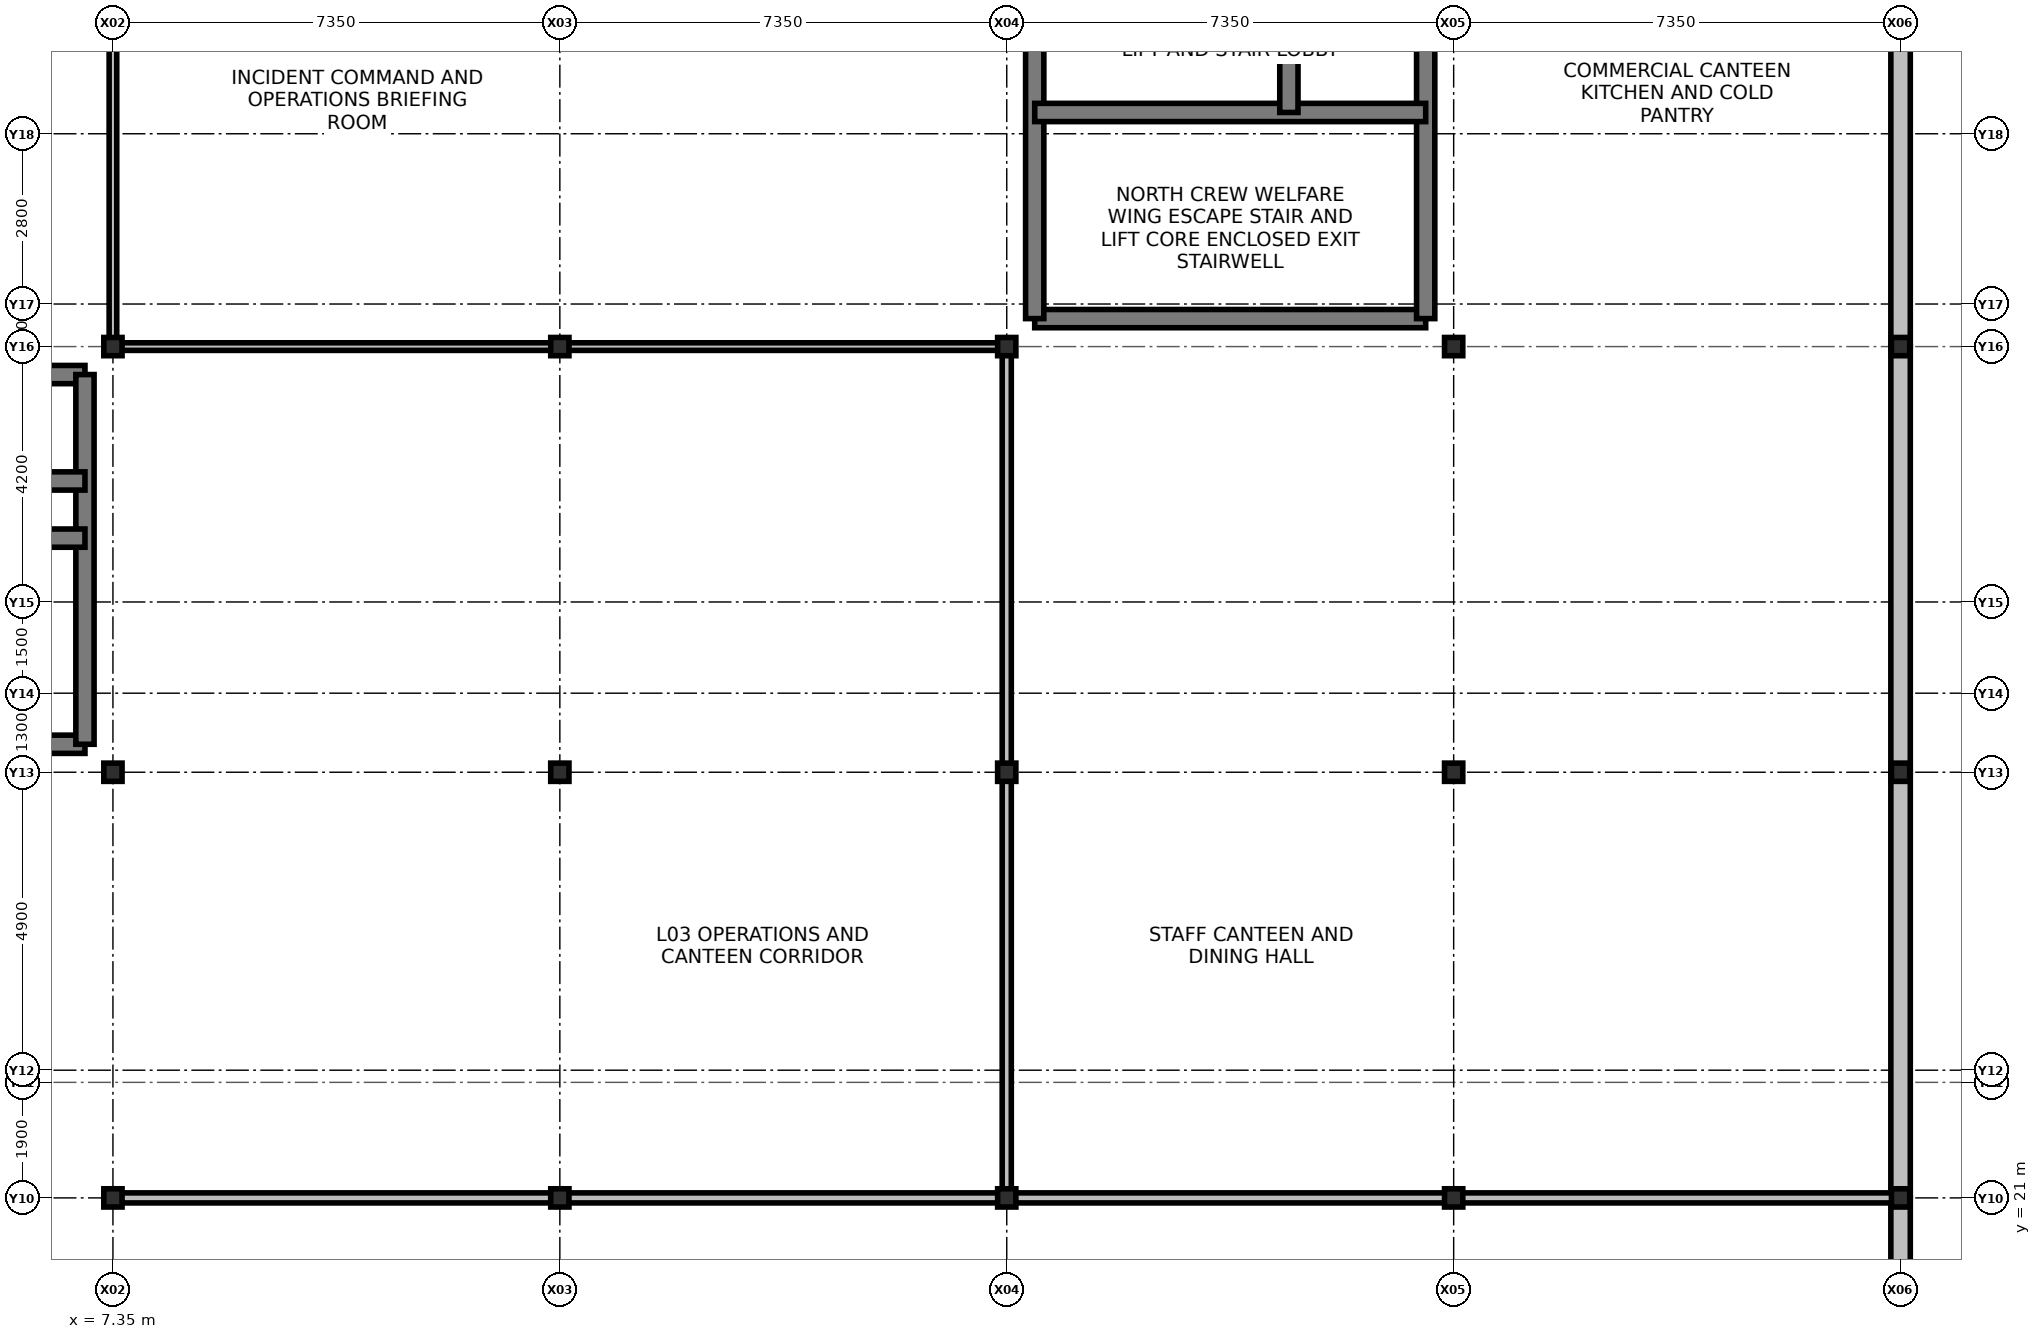
"""IFC4 building model, lengths in metres.
Left out: names, types, materials, properties, quantities, classifications, styles, units other than length and angle.
Written with IfcOpenShell. Run it as: python <this file> out.ifc"""

import sys

from ifc_helpers import new_model, si_unit, direction, frame, frame_2d, origin, origin_2d, place, context, subcontext, project, spatial, rectangle, i_section, extrude, element, fill, save


model = new_model("IFC4")
c1 = context("Model", 3, precision=1e-05, world=origin(), true_north=direction((0.0, 1.0)))
c2 = subcontext(c1, "Body", "Model", "MODEL_VIEW")
j1 = project(units=[si_unit("LENGTHUNIT", "METRE"), si_unit("PLANEANGLEUNIT", "RADIAN")], contexts=[c1])
p1 = place(None, origin())
s1 = spatial("IfcSite", under=j1, at=p1, CompositionType="ELEMENT")
p2 = place(p1, origin())
s2 = spatial("IfcBuilding", under=s1, at=p2, CompositionType="ELEMENT")
p3 = place(p2, frame((0.0, 0.0, 11.1)))
s3 = spatial("IfcBuildingStorey", under=s2, at=p3, CompositionType="ELEMENT", Elevation=11.1)
for number, where, z_axis, x_axis in (
    (1, (7.35, 21.0, 0.0), (0.0, 0.0, 1.0), (1.0, 0.0, 0.0)),
    (2, (7.35, 28.0, 0.0), (0.0, 0.0, 1.0), (1.0, 0.0, 0.0)),
    (3, (7.35, 35.0, 0.0), (0.0, 0.0, 1.0), (1.0, 0.0, 0.0)),
    (4, (14.7, 21.0, 0.0), (0.0, 0.0, 1.0), (1.0, 0.0, 0.0)),
    (5, (14.7, 28.0, 0.0), (0.0, 0.0, 1.0), (1.0, 0.0, 0.0)),
    (6, (14.7, 35.0, 0.0), (0.0, 0.0, 1.0), (1.0, 0.0, 0.0)),
    (7, (22.05, 21.0, 0.0), (0.0, 0.0, 1.0), (1.0, 0.0, 0.0)),
    (8, (22.05, 28.0, 0.0), (0.0, 0.0, 1.0), (1.0, 0.0, 0.0)),
    (9, (22.05, 35.0, 0.0), (0.0, 0.0, 1.0), (1.0, 0.0, 0.0)),
    (10, (29.4, 21.0, 0.0), (0.0, 0.0, 1.0), (1.0, 0.0, 0.0)),
    (11, (29.4, 28.0, 0.0), (0.0, 0.0, 1.0), (1.0, 0.0, 0.0)),
    (12, (29.4, 35.0, 0.0), (0.0, 0.0, 1.0), (1.0, 0.0, 0.0)),
    (13, (36.75, 21.0, 0.0), (0.0, 0.0, 1.0), (1.0, 0.0, 0.0)),
    (14, (36.75, 28.0, 0.0), (0.0, 0.0, 1.0), (1.0, 0.0, 0.0)),
    (15, (36.75, 35.0, 0.0), (0.0, 0.0, 1.0), (1.0, 0.0, 0.0)),
):
    element("IfcColumn", number, at=place(p3, frame(where, z_axis=z_axis, x_axis=x_axis)), inside=s3, PredefinedType="COLUMN", context=c2, shape_type="SweptSolid", body=[
        extrude(i_section(OverallWidth=0.3, OverallDepth=0.3, WebThickness=0.01, FlangeThickness=0.015, at=origin_2d()), origin(), (0.0, 0.0, 1.0), 4.2),
    ])
p4 = place(p3, frame((36.75, 14.0, 0.0), z_axis=(0.0, 0.0, 1.0), x_axis=(0.0, 1.0, 0.0)))
e16 = element("IfcWall", 16, at=p4, inside=s3, PredefinedType="SOLIDWALL", context=c2, shape_type="SweptSolid", body=[
    extrude(rectangle(XDim=7.0, YDim=0.32, at=frame_2d((3.5, 0.0))), origin(), (0.0, 0.0, 1.0), 3.35),
])
p5 = place(p3, frame((36.75, 21.0, 0.0), z_axis=(0.0, 0.0, 1.0), x_axis=(0.0, 1.0, 0.0)))
e17 = element("IfcWall", 17, at=p5, inside=s3, PredefinedType="SOLIDWALL", context=c2, shape_type="SweptSolid", body=[
    extrude(rectangle(XDim=7.0, YDim=0.32, at=frame_2d((3.5, 0.0))), origin(), (0.0, 0.0, 1.0), 3.35),
])
p6 = place(p5, frame((2.95, 0.0, 0.0)))
e18 = element("IfcOpeningElement", 18, at=p6, cuts=e17, PredefinedType="OPENING", context=c2, shape_type="SweptSolid", body=[
    extrude(rectangle(XDim=1.1, YDim=2.2, at=frame_2d((0.55, 1.1))), frame((0.0, 0.17, 0.0), z_axis=(0.0, -1.0, 0.0), x_axis=(1.0, 0.0, 0.0)), (0.0, 0.0, 1.0), 0.34),
])
p7 = place(p3, frame((36.75, 28.0, 0.0), z_axis=(0.0, 0.0, 1.0), x_axis=(0.0, 1.0, 0.0)))
e19 = element("IfcWall", 19, at=p7, inside=s3, PredefinedType="SOLIDWALL", context=c2, shape_type="SweptSolid", body=[
    extrude(rectangle(XDim=7.0, YDim=0.32, at=frame_2d((3.5, 0.0))), origin(), (0.0, 0.0, 1.0), 3.35),
])
p8 = place(p7, frame((2.95, 0.0, 0.0)))
e20 = element("IfcOpeningElement", 20, at=p8, cuts=e19, PredefinedType="OPENING", context=c2, shape_type="SweptSolid", body=[
    extrude(rectangle(XDim=1.1, YDim=2.2, at=frame_2d((0.55, 1.1))), frame((0.0, 0.17, 0.0), z_axis=(0.0, -1.0, 0.0), x_axis=(1.0, 0.0, 0.0)), (0.0, 0.0, 1.0), 0.34),
])
p9 = place(p3, frame((36.75, 35.0, 0.0), z_axis=(0.0, 0.0, 1.0), x_axis=(0.0, 1.0, 0.0)))
e21 = element("IfcWall", 21, at=p9, inside=s3, PredefinedType="SOLIDWALL", context=c2, shape_type="SweptSolid", body=[
    extrude(rectangle(XDim=7.0, YDim=0.32, at=frame_2d((3.5, 0.0))), origin(), (0.0, 0.0, 1.0), 3.35),
])
p10 = place(p3, frame((0.46, 28.46, 0.0), z_axis=(0.0, 0.0, 1.0), x_axis=(1.0, 0.0, 0.0)))
e22 = element("IfcWall", 22, at=p10, inside=s3, PredefinedType="SHEAR", context=c2, shape_type="SweptSolid", body=[
    extrude(rectangle(XDim=6.43, YDim=0.3, at=frame_2d((3.215, 0.0))), origin(), (0.0, 0.0, 1.0), 3.92),
])
p11 = place(p3, frame((0.46, 34.54, 0.0), z_axis=(0.0, 0.0, 1.0), x_axis=(1.0, 0.0, 0.0)))
e23 = element("IfcWall", 23, at=p11, inside=s3, PredefinedType="SHEAR", context=c2, shape_type="SweptSolid", body=[
    extrude(rectangle(XDim=6.43, YDim=0.3, at=frame_2d((3.215, 0.0))), origin(), (0.0, 0.0, 1.0), 3.92),
])
p12 = place(p11, frame((0.55, 0.0, 0.0)))
e24 = element("IfcOpeningElement", 24, at=p12, cuts=e23, PredefinedType="OPENING", context=c2, shape_type="SweptSolid", body=[
    extrude(rectangle(XDim=1.5, YDim=2.2, at=frame_2d((0.75, 1.1))), frame((0.0, 0.16, 0.0), z_axis=(0.0, -1.0, 0.0), x_axis=(1.0, 0.0, 0.0)), (0.0, 0.0, 1.0), 0.32),
])
p13 = place(p3, frame((6.89, 28.46, 0.0), z_axis=(0.0, 0.0, 1.0), x_axis=(0.0, 1.0, 0.0)))
e25 = element("IfcWall", 25, at=p13, inside=s3, PredefinedType="SHEAR", context=c2, shape_type="SweptSolid", body=[
    extrude(rectangle(XDim=6.08, YDim=0.3, at=frame_2d((3.04, 0.0))), origin(), (0.0, 0.0, 1.0), 3.92),
])
p14 = place(p3, frame((0.46, 31.85, 0.0), z_axis=(0.0, 0.0, 1.0), x_axis=(1.0, 0.0, 0.0)))
e26 = element("IfcWall", 26, at=p14, inside=s3, PredefinedType="SHEAR", context=c2, shape_type="SweptSolid", body=[
    extrude(rectangle(XDim=6.43, YDim=0.3, at=frame_2d((3.215, 0.0))), origin(), (0.0, 0.0, 1.0), 3.92),
])
p15 = place(p14, frame((0.185, 0.0, 0.0)))
e27 = element("IfcOpeningElement", 27, at=p15, cuts=e26, PredefinedType="OPENING", context=c2, shape_type="SweptSolid", body=[
    extrude(rectangle(XDim=1.05, YDim=2.15, at=frame_2d((0.525, 1.075))), frame((0.0, 0.16, 0.0), z_axis=(0.0, -1.0, 0.0), x_axis=(1.0, 0.0, 0.0)), (0.0, 0.0, 1.0), 0.32),
])
p16 = place(p3, frame((3.34, 32.79, 0.0), z_axis=(0.0, 0.0, 1.0), x_axis=(1.0, 0.0, 0.0)))
e28 = element("IfcWall", 28, at=p16, inside=s3, PredefinedType="SHEAR", context=c2, shape_type="SweptSolid", body=[
    extrude(rectangle(XDim=3.55, YDim=0.3, at=frame_2d((1.775, 0.0))), origin(), (0.0, 0.0, 1.0), 3.92),
])
p17 = place(p16, frame((0.25, 0.0, 0.0)))
e29 = element("IfcOpeningElement", 29, at=p17, cuts=e28, PredefinedType="OPENING", context=c2, shape_type="SweptSolid", body=[
    extrude(rectangle(XDim=1.1, YDim=2.15, at=frame_2d((0.55, 1.075))), frame((0.0, 0.16, 0.0), z_axis=(0.0, -1.0, 0.0), x_axis=(1.0, 0.0, 0.0)), (0.0, 0.0, 1.0), 0.32),
])
p18 = place(p16, frame((1.75, 0.0, 0.0)))
e30 = element("IfcOpeningElement", 30, at=p18, cuts=e28, PredefinedType="OPENING", context=c2, shape_type="SweptSolid", body=[
    extrude(rectangle(XDim=1.2, YDim=2.2, at=frame_2d((0.6, 1.1))), frame((0.0, 0.16, 0.0), z_axis=(0.0, -1.0, 0.0), x_axis=(1.0, 0.0, 0.0)), (0.0, 0.0, 1.0), 0.32),
])
p19 = place(p3, frame((22.51, 35.46, 0.0), z_axis=(0.0, 0.0, 1.0), x_axis=(1.0, 0.0, 0.0)))
e31 = element("IfcWall", 31, at=p19, inside=s3, PredefinedType="SHEAR", context=c2, shape_type="SweptSolid", body=[
    extrude(rectangle(XDim=6.43, YDim=0.3, at=frame_2d((3.215, 0.0))), origin(), (0.0, 0.0, 1.0), 3.92),
])
for number, where, z_axis, x_axis in (
    (32, (22.51, 35.46, 0.0), (0.0, 0.0, 1.0), (0.0, 1.0, 0.0)),
    (33, (28.94, 35.46, 0.0), (0.0, 0.0, 1.0), (0.0, 1.0, 0.0)),
):
    element("IfcWall", number, at=place(p3, frame(where, z_axis=z_axis, x_axis=x_axis)), inside=s3, PredefinedType="SHEAR", context=c2, shape_type="SweptSolid", body=[
        extrude(rectangle(XDim=6.08, YDim=0.3, at=frame_2d((3.04, 0.0))), origin(), (0.0, 0.0, 1.0), 3.92),
    ])
p20 = place(p3, frame((22.51, 38.85, 0.0), z_axis=(0.0, 0.0, 1.0), x_axis=(1.0, 0.0, 0.0)))
e34 = element("IfcWall", 34, at=p20, inside=s3, PredefinedType="SHEAR", context=c2, shape_type="SweptSolid", body=[
    extrude(rectangle(XDim=6.43, YDim=0.3, at=frame_2d((3.215, 0.0))), origin(), (0.0, 0.0, 1.0), 3.92),
])
p21 = place(p20, frame((0.185, 0.0, 0.0)))
e35 = element("IfcOpeningElement", 35, at=p21, cuts=e34, PredefinedType="OPENING", context=c2, shape_type="SweptSolid", body=[
    extrude(rectangle(XDim=1.05, YDim=2.15, at=frame_2d((0.525, 1.075))), frame((0.0, 0.16, 0.0), z_axis=(0.0, -1.0, 0.0), x_axis=(1.0, 0.0, 0.0)), (0.0, 0.0, 1.0), 0.32),
])
p22 = place(p3, frame((26.69, 38.85, 0.0), z_axis=(0.0, 0.0, 1.0), x_axis=(0.0, 1.0, 0.0)))
e36 = element("IfcWall", 36, at=p22, inside=s3, PredefinedType="SHEAR", context=c2, shape_type="SweptSolid", body=[
    extrude(rectangle(XDim=2.69, YDim=0.3, at=frame_2d((1.345, 0.0))), origin(), (0.0, 0.0, 1.0), 3.92),
])
p23 = place(p22, frame((0.4, 0.0, 0.0)))
e37 = element("IfcOpeningElement", 37, at=p23, cuts=e36, PredefinedType="OPENING", context=c2, shape_type="SweptSolid", body=[
    extrude(rectangle(XDim=1.1, YDim=2.15, at=frame_2d((0.55, 1.075))), frame((0.0, 0.16, 0.0), z_axis=(0.0, -1.0, 0.0), x_axis=(1.0, 0.0, 0.0)), (0.0, 0.0, 1.0), 0.32),
])
p24 = place(p3, frame((7.35, 21.0, 0.0), z_axis=(0.0, 0.0, 1.0), x_axis=(1.0, 0.0, 0.0)))
e38 = element("IfcWall", 38, at=p24, inside=s3, PredefinedType="PARTITIONING", context=c2, shape_type="SweptSolid", body=[
    extrude(rectangle(XDim=29.4, YDim=0.165, at=frame_2d((14.7, 0.0))), origin(), (0.0, 0.0, 1.0), 3.15),
])
p25 = place(p24, frame((4.0, 0.0, 0.0)))
e39 = element("IfcOpeningElement", 39, at=p25, cuts=e38, PredefinedType="OPENING", context=c2, shape_type="SweptSolid", body=[
    extrude(rectangle(XDim=1.35, YDim=2.2, at=frame_2d((0.675, 1.1))), frame((0.0, 0.092, 0.0), z_axis=(0.0, -1.0, 0.0), x_axis=(1.0, 0.0, 0.0)), (0.0, 0.0, 1.0), 0.185),
])
p26 = place(p24, frame((18.5, 0.0, 0.0)))
e40 = element("IfcOpeningElement", 40, at=p26, cuts=e38, PredefinedType="OPENING", context=c2, shape_type="SweptSolid", body=[
    extrude(rectangle(XDim=1.4, YDim=2.2, at=frame_2d((0.7, 1.1))), frame((0.0, 0.092, 0.0), z_axis=(0.0, -1.0, 0.0), x_axis=(1.0, 0.0, 0.0)), (0.0, 0.0, 1.0), 0.185),
])
p27 = place(p3, frame((22.05, 21.0, 0.0), z_axis=(0.0, 0.0, 1.0), x_axis=(0.0, 1.0, 0.0)))
e41 = element("IfcWall", 41, at=p27, inside=s3, PredefinedType="PARTITIONING", context=c2, shape_type="SweptSolid", body=[
    extrude(rectangle(XDim=14.0, YDim=0.15, at=frame_2d((7.0, 0.0))), origin(), (0.0, 0.0, 1.0), 3.15),
])
p28 = place(p27, frame((4.2, 0.0, 0.0)))
e42 = element("IfcOpeningElement", 42, at=p28, cuts=e41, PredefinedType="OPENING", context=c2, shape_type="SweptSolid", body=[
    extrude(rectangle(XDim=1.6, YDim=2.2, at=frame_2d((0.8, 1.1))), frame((0.0, 0.085, 0.0), z_axis=(0.0, -1.0, 0.0), x_axis=(1.0, 0.0, 0.0)), (0.0, 0.0, 1.0), 0.17),
])
p29 = place(p3, frame((7.35, 35.0, 0.0), z_axis=(0.0, 0.0, 1.0), x_axis=(1.0, 0.0, 0.0)))
e43 = element("IfcWall", 43, at=p29, inside=s3, PredefinedType="PARTITIONING", context=c2, shape_type="SweptSolid", body=[
    extrude(rectangle(XDim=14.7, YDim=0.125, at=frame_2d((7.35, 0.0))), origin(), (0.0, 0.0, 1.0), 3.15),
])
p30 = place(p29, frame((4.2, 0.0, 0.0)))
e44 = element("IfcOpeningElement", 44, at=p30, cuts=e43, PredefinedType="OPENING", context=c2, shape_type="SweptSolid", body=[
    extrude(rectangle(XDim=1.15, YDim=2.15, at=frame_2d((0.575, 1.075))), frame((0.0, 0.072, 0.0), z_axis=(0.0, -1.0, 0.0), x_axis=(1.0, 0.0, 0.0)), (0.0, 0.0, 1.0), 0.145),
])
p31 = place(p3, frame((7.35, 35.0, 0.0), z_axis=(0.0, 0.0, 1.0), x_axis=(0.0, 1.0, 0.0)))
e45 = element("IfcWall", 45, at=p31, inside=s3, PredefinedType="PARTITIONING", context=c2, shape_type="SweptSolid", body=[
    extrude(rectangle(XDim=28.0, YDim=0.125, at=frame_2d((14.0, 0.0))), origin(), (0.0, 0.0, 1.0), 3.15),
])
p32 = place(p31, frame((4.0, 0.0, 0.0)))
e46 = element("IfcOpeningElement", 46, at=p32, cuts=e45, PredefinedType="OPENING", context=c2, shape_type="SweptSolid", body=[
    extrude(rectangle(XDim=0.9, YDim=2.1, at=frame_2d((0.45, 1.05))), frame((0.0, 0.072, 0.0), z_axis=(0.0, -1.0, 0.0), x_axis=(1.0, 0.0, 0.0)), (0.0, 0.0, 1.0), 0.145),
])
p33 = place(p31, frame((11.0, 0.0, 0.0)))
e47 = element("IfcOpeningElement", 47, at=p33, cuts=e45, PredefinedType="OPENING", context=c2, shape_type="SweptSolid", body=[
    extrude(rectangle(XDim=0.95, YDim=2.2, at=frame_2d((0.475, 1.1))), frame((0.0, 0.072, 0.0), z_axis=(0.0, -1.0, 0.0), x_axis=(1.0, 0.0, 0.0)), (0.0, 0.0, 1.0), 0.145),
])
p34 = place(p6, frame((1.1, 0.0, 0.0), z_axis=(0.0, 0.0, 1.0), x_axis=(-1.0, 0.0, 0.0)))
e48 = element("IfcDoor", 48, at=p34, inside=s3, OperationType="SINGLE_SWING_RIGHT", PredefinedType="DOOR", context=c2, shape_type="SweptSolid", body=[
    extrude(rectangle(XDim=1.1, YDim=2.2, at=frame_2d((0.55, 1.1))), frame((0.0, 0.025, 0.0), z_axis=(0.0, -1.0, 0.0), x_axis=(1.0, 0.0, 0.0)), (0.0, 0.0, 1.0), 0.05),
])
fill(e18, e48)
p35 = place(p8, frame((1.1, 0.0, 0.0), z_axis=(0.0, 0.0, 1.0), x_axis=(-1.0, 0.0, 0.0)))
e49 = element("IfcDoor", 49, at=p35, inside=s3, OperationType="SINGLE_SWING_RIGHT", PredefinedType="DOOR", context=c2, shape_type="SweptSolid", body=[
    extrude(rectangle(XDim=1.1, YDim=2.2, at=frame_2d((0.55, 1.1))), frame((0.0, 0.025, 0.0), z_axis=(0.0, -1.0, 0.0), x_axis=(1.0, 0.0, 0.0)), (0.0, 0.0, 1.0), 0.05),
])
fill(e20, e49)
p36 = place(p21, origin())
e50 = element("IfcDoor", 50, at=p36, inside=s3, OperationType="SINGLE_SWING_RIGHT", PredefinedType="DOOR", context=c2, shape_type="SweptSolid", body=[
    extrude(rectangle(XDim=1.05, YDim=2.15, at=frame_2d((0.525, 1.075))), frame((0.0, 0.025, 0.0), z_axis=(0.0, -1.0, 0.0), x_axis=(1.0, 0.0, 0.0)), (0.0, 0.0, 1.0), 0.05),
])
fill(e35, e50)
p37 = place(p23, origin())
e51 = element("IfcDoor", 51, at=p37, inside=s3, OperationType="SLIDING_TO_LEFT", PredefinedType="DOOR", context=c2, shape_type="SweptSolid", body=[
    extrude(rectangle(XDim=1.1, YDim=2.15, at=frame_2d((0.55, 1.075))), frame((0.0, 0.025, 0.0), z_axis=(0.0, -1.0, 0.0), x_axis=(1.0, 0.0, 0.0)), (0.0, 0.0, 1.0), 0.05),
])
fill(e37, e51)
p38 = place(p25, origin())
e52 = element("IfcDoor", 52, at=p38, inside=s3, OperationType="DOUBLE_DOOR_SINGLE_SWING", PredefinedType="DOOR", context=c2, shape_type="SweptSolid", body=[
    extrude(rectangle(XDim=1.35, YDim=2.2, at=frame_2d((0.675, 1.1))), frame((0.0, 0.025, 0.0), z_axis=(0.0, -1.0, 0.0), x_axis=(1.0, 0.0, 0.0)), (0.0, 0.0, 1.0), 0.05),
])
fill(e39, e52)
p39 = place(p26, origin())
e53 = element("IfcDoor", 53, at=p39, inside=s3, OperationType="DOUBLE_DOOR_SINGLE_SWING", PredefinedType="DOOR", context=c2, shape_type="SweptSolid", body=[
    extrude(rectangle(XDim=1.4, YDim=2.2, at=frame_2d((0.7, 1.1))), frame((0.0, 0.025, 0.0), z_axis=(0.0, -1.0, 0.0), x_axis=(1.0, 0.0, 0.0)), (0.0, 0.0, 1.0), 0.05),
])
fill(e40, e53)
p40 = place(p28, origin())
e54 = element("IfcDoor", 54, at=p40, inside=s3, OperationType="DOUBLE_DOOR_SINGLE_SWING", PredefinedType="DOOR", context=c2, shape_type="SweptSolid", body=[
    extrude(rectangle(XDim=1.6, YDim=2.2, at=frame_2d((0.8, 1.1))), frame((0.0, 0.025, 0.0), z_axis=(0.0, -1.0, 0.0), x_axis=(1.0, 0.0, 0.0)), (0.0, 0.0, 1.0), 0.05),
])
fill(e42, e54)
p41 = place(p30, origin())
e55 = element("IfcDoor", 55, at=p41, inside=s3, OperationType="SINGLE_SWING_LEFT", PredefinedType="DOOR", context=c2, shape_type="SweptSolid", body=[
    extrude(rectangle(XDim=1.15, YDim=2.15, at=frame_2d((0.575, 1.075))), frame((0.0, 0.025, 0.0), z_axis=(0.0, -1.0, 0.0), x_axis=(1.0, 0.0, 0.0)), (0.0, 0.0, 1.0), 0.05),
])
fill(e44, e55)
p42 = place(p32, origin())
e56 = element("IfcDoor", 56, at=p42, inside=s3, OperationType="SINGLE_SWING_RIGHT", PredefinedType="DOOR", context=c2, shape_type="SweptSolid", body=[
    extrude(rectangle(XDim=0.9, YDim=2.1, at=frame_2d((0.45, 1.05))), frame((0.0, 0.025, 0.0), z_axis=(0.0, -1.0, 0.0), x_axis=(1.0, 0.0, 0.0)), (0.0, 0.0, 1.0), 0.05),
])
fill(e46, e56)
save(model, sys.argv[1])
